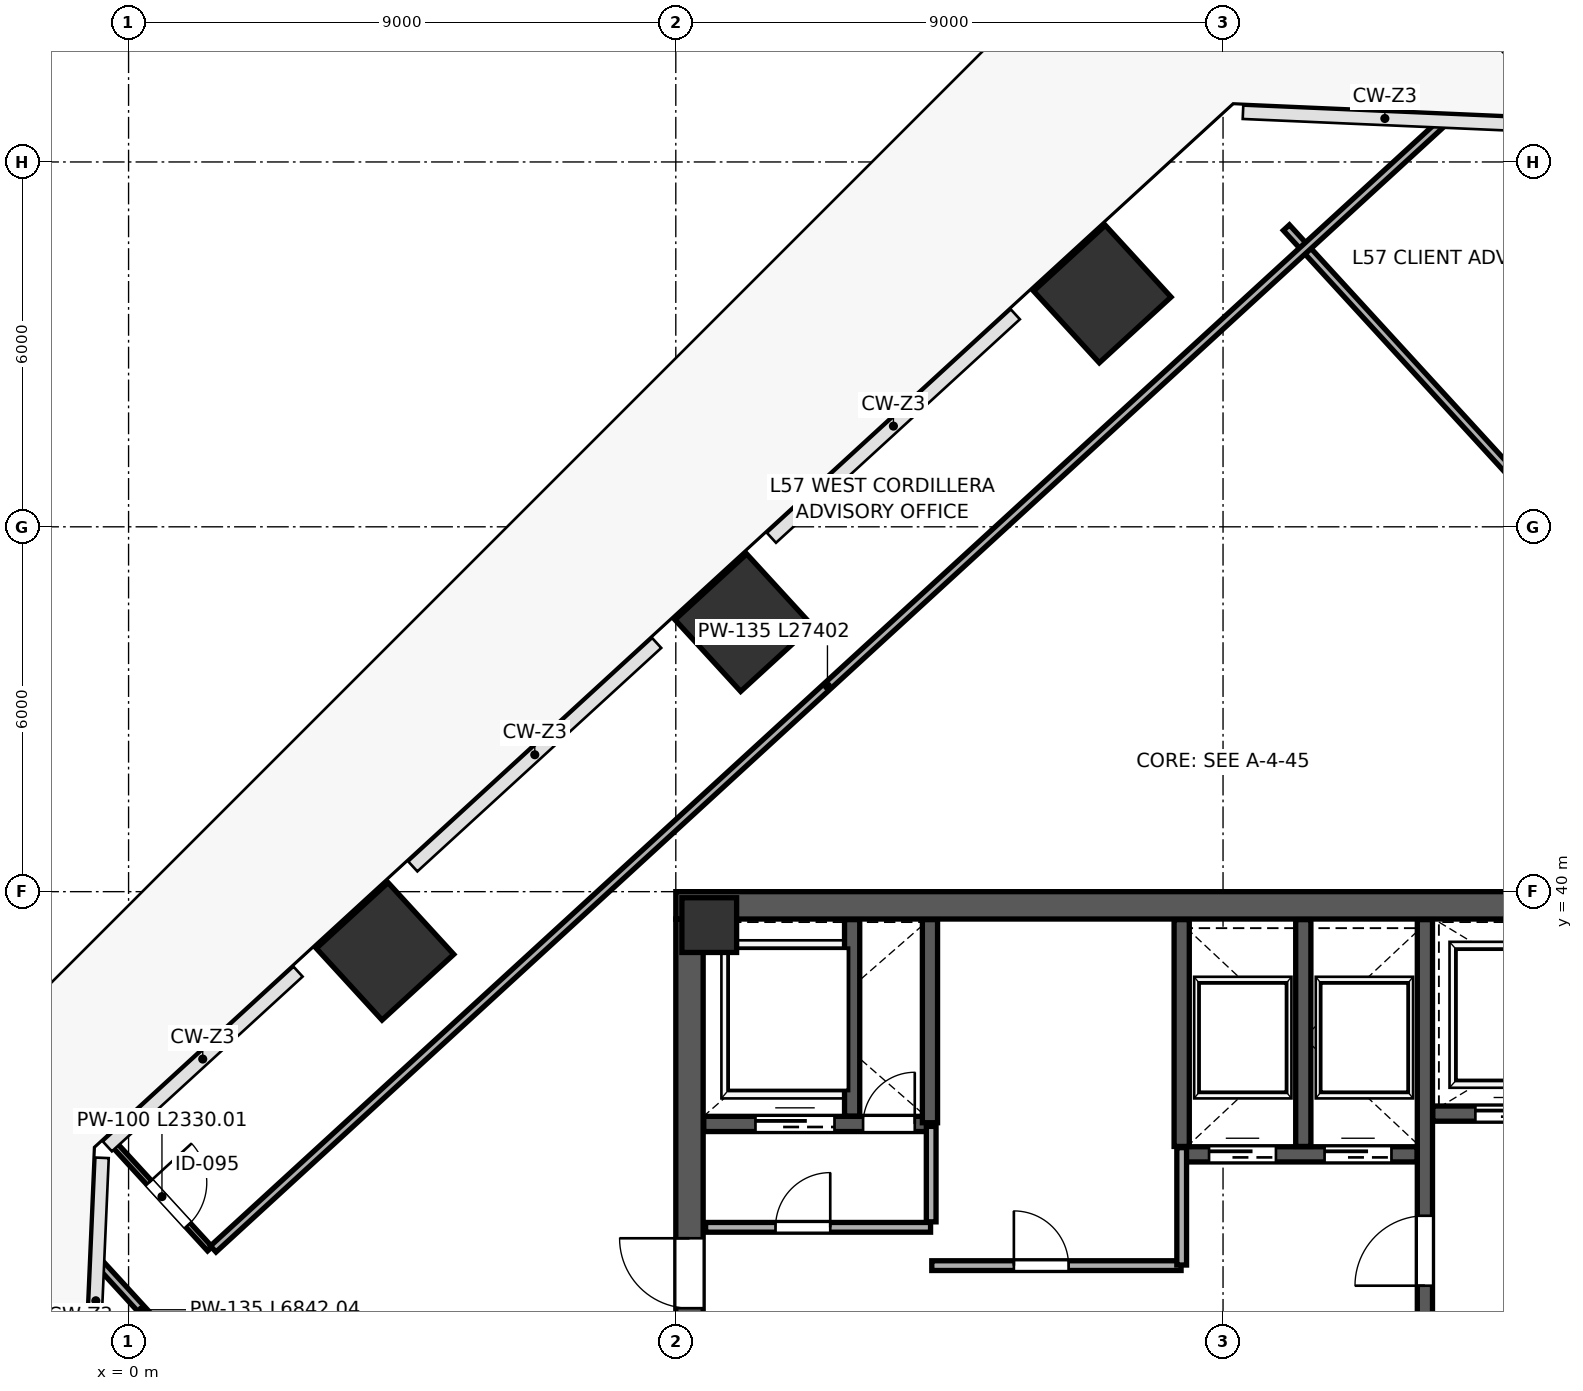
"""IFC4 building model, lengths in metres.
Left out: names, types, materials, properties, quantities, classifications, styles, units other than length and angle.
Written with IfcOpenShell. Run it as: python <this file> out.ifc"""

import sys

from ifc_helpers import new_model, si_unit, direction, frame, frame_2d, origin, origin_2d, place, context, subcontext, project, spatial, rectangle, extrude, source, transform, mapped, element, fill, save


model = new_model("IFC4")
c1 = context("Model", 3, precision=1e-05, world=origin(), true_north=direction((0.0, 1.0)))
c2 = subcontext(c1, "Body", "Model", "MODEL_VIEW")
j1 = project(units=[si_unit("LENGTHUNIT", "METRE"), si_unit("PLANEANGLEUNIT", "RADIAN")], contexts=[c1])
p1 = place(None, origin())
s1 = spatial("IfcSite", under=j1, at=p1, CompositionType="ELEMENT")
p2 = place(p1, origin())
s2 = spatial("IfcBuilding", under=s1, at=p2, CompositionType="ELEMENT")
p3 = place(p2, frame((0.0, 0.0, 254.2)))
s3 = spatial("IfcBuildingStorey", under=s2, at=p3, CompositionType="ELEMENT", Elevation=254.2)
m1 = source(origin(), c2, "Body", "SweptSolid", [
    extrude(rectangle(XDim=0.9, YDim=0.9, at=origin_2d()), origin(), (0.0, 0.0, 1.0), 4.198),
])
p4 = place(p3, frame((9.55, 39.45, 0.001), z_axis=(0.0, 0.0, 1.0), x_axis=(1.0, 0.0, 0.0)))
e1 = element("IfcColumn", 1, at=p4, inside=s3, PredefinedType="COLUMN", context=c2, shape_type="MappedRepresentation", body=[
    mapped(m1, transform((0.0, 0.0, 0.0), scale=1.0)),
])
m2 = source(origin(), c2, "Body", "SweptSolid", [
    extrude(rectangle(XDim=1.6, YDim=1.6, at=origin_2d()), origin(), (0.0, 0.0, 1.0), 4.198),
])
for number, where, z_axis, x_axis in (
    (2, (4.218, 39.018, 0.001), (0.0, 0.0, 1.0), (-0.676, 0.737, 0.0)),
    (3, (10.116, 44.423, 0.001), (0.0, 0.0, 1.0), (-0.676, 0.737, 0.0)),
    (4, (16.014, 49.828, 0.001), (0.0, 0.0, 1.0), (-0.676, 0.737, 0.0)),
):
    element("IfcColumn", number, at=place(p3, frame(where, z_axis=z_axis, x_axis=x_axis)), inside=s3, PredefinedType="COLUMN", context=c2, shape_type="MappedRepresentation", body=[
        mapped(m2, transform((0.0, 0.0, 0.0), scale=1.0)),
    ])
p5 = place(p3, frame((9.225, 24.45, 0.0), z_axis=(0.0, 0.0, 1.0), x_axis=(0.0, 1.0, 0.0)))
e5 = element("IfcWall", 5, at=p5, inside=s3, PredefinedType="SHEAR", context=c2, shape_type="SweptSolid", body=[
    extrude(rectangle(XDim=15.1, YDim=0.45, at=frame_2d((7.55, 0.0))), origin(), (0.0, 0.0, 1.0), 3.96),
])
p6 = place(p5, frame((8.7, 0.0, 0.0)))
e6 = element("IfcOpeningElement", 6, at=p6, cuts=e5, PredefinedType="OPENING", context=c2, shape_type="SweptSolid", body=[
    extrude(rectangle(XDim=1.15, YDim=2.2, at=frame_2d((0.575, 1.1))), frame((0.0, 0.235, 0.0), z_axis=(0.0, -1.0, 0.0), x_axis=(1.0, 0.0, 0.0)), (0.0, 0.0, 1.0), 0.47),
])
p7 = place(p3, frame((9.0, 39.775, 0.0), z_axis=(0.0, 0.0, 1.0), x_axis=(1.0, 0.0, 0.0)))
e7 = element("IfcWall", 7, at=p7, inside=s3, PredefinedType="SHEAR", context=c2, shape_type="SweptSolid", body=[
    extrude(rectangle(XDim=18.0, YDim=0.45, at=frame_2d((9.0, 0.0))), origin(), (0.0, 0.0, 1.0), 3.96),
])
p8 = place(p3, frame((21.32, 32.12, 0.0), z_axis=(0.0, 0.0, 1.0), x_axis=(0.0, 1.0, 0.0)))
e8 = element("IfcWall", 8, at=p8, inside=s3, PredefinedType="SHEAR", context=c2, shape_type="SweptSolid", body=[
    extrude(rectangle(XDim=7.42, YDim=0.25, at=frame_2d((3.71, 0.0))), origin(), (0.0, 0.0, 1.0), 3.96),
])
p9 = place(p8, frame((1.4, 0.0, 0.0)))
e9 = element("IfcOpeningElement", 9, at=p9, cuts=e8, PredefinedType="OPENING", context=c2, shape_type="SweptSolid", body=[
    extrude(rectangle(XDim=1.15, YDim=2.2, at=frame_2d((0.575, 1.1))), frame((0.0, 0.135, 0.0), z_axis=(0.0, -1.0, 0.0), x_axis=(1.0, 0.0, 0.0)), (0.0, 0.0, 1.0), 0.27),
])
p10 = place(p3, frame((9.46, 36.18, 0.0), z_axis=(0.0, 0.0, 1.0), x_axis=(1.0, 0.0, 0.0)))
e10 = element("IfcWall", 10, at=p10, inside=s3, PredefinedType="SHEAR", context=c2, shape_type="SweptSolid", body=[
    extrude(rectangle(XDim=3.79, YDim=0.25, at=frame_2d((1.895, 0.0))), origin(), (0.0, 0.0, 1.0), 3.96),
])
p11 = place(p10, frame((2.62, 0.0, 0.0)))
e11 = element("IfcOpeningElement", 11, at=p11, cuts=e10, PredefinedType="OPENING", context=c2, shape_type="SweptSolid", body=[
    extrude(rectangle(XDim=0.85, YDim=2.1, at=frame_2d((0.425, 1.05))), frame((0.0, 0.135, 0.0), z_axis=(0.0, -1.0, 0.0), x_axis=(1.0, 0.0, 0.0)), (0.0, 0.0, 1.0), 0.27),
])
p12 = place(p10, frame((0.85, 0.0, 0.0)))
e12 = element("IfcOpeningElement", 12, at=p12, cuts=e10, PredefinedType="OPENING", context=c2, shape_type="SweptSolid", body=[
    extrude(rectangle(XDim=1.3, YDim=2.25, at=frame_2d((0.65, 1.125))), frame((0.0, 0.135, 0.0), z_axis=(0.0, -1.0, 0.0), x_axis=(1.0, 0.0, 0.0)), (0.0, 0.0, 1.0), 0.27),
])
p13 = place(p3, frame((11.9, 36.31, 0.0), z_axis=(0.0, 0.0, 1.0), x_axis=(0.0, 1.0, 0.0)))
e13 = element("IfcWall", 13, at=p13, inside=s3, PredefinedType="SHEAR", context=c2, shape_type="SweptSolid", body=[
    extrude(rectangle(XDim=3.23, YDim=0.25, at=frame_2d((1.615, 0.0))), origin(), (0.0, 0.0, 1.0), 3.96),
])
p14 = place(p3, frame((21.45, 36.35, 0.0), z_axis=(0.0, 0.0, 1.0), x_axis=(1.0, 0.0, 0.0)))
e14 = element("IfcWall", 14, at=p14, inside=s3, PredefinedType="SHEAR", context=c2, shape_type="SweptSolid", body=[
    extrude(rectangle(XDim=5.09, YDim=0.25, at=frame_2d((2.545, 0.0))), origin(), (0.0, 0.0, 1.0), 3.96),
])
p15 = place(p14, frame((0.7, 0.0, 0.0)))
e15 = element("IfcOpeningElement", 15, at=p15, cuts=e14, PredefinedType="OPENING", context=c2, shape_type="SweptSolid", body=[
    extrude(rectangle(XDim=1.2, YDim=2.2, at=frame_2d((0.6, 1.1))), frame((0.0, 0.135, 0.0), z_axis=(0.0, -1.0, 0.0), x_axis=(1.0, 0.0, 0.0)), (0.0, 0.0, 1.0), 0.27),
])
p16 = place(p14, frame((3.25, 0.0, 0.0)))
e16 = element("IfcOpeningElement", 16, at=p16, cuts=e14, PredefinedType="OPENING", context=c2, shape_type="SweptSolid", body=[
    extrude(rectangle(XDim=1.2, YDim=2.2, at=frame_2d((0.6, 1.1))), frame((0.0, 0.135, 0.0), z_axis=(0.0, -1.0, 0.0), x_axis=(1.0, 0.0, 0.0)), (0.0, 0.0, 1.0), 0.27),
])
p17 = place(p3, frame((13.18, 36.2, 0.0), z_axis=(0.0, 0.0, 1.0), x_axis=(0.0, 1.0, 0.0)))
e17 = element("IfcWall", 17, at=p17, inside=s3, PredefinedType="SHEAR", context=c2, shape_type="SweptSolid", body=[
    extrude(rectangle(XDim=3.34, YDim=0.25, at=frame_2d((1.67, 0.0))), origin(), (0.0, 0.0, 1.0), 3.96),
])
p18 = place(p3, frame((17.32, 35.68, 0.0), z_axis=(0.0, 0.0, 1.0), x_axis=(1.0, 0.0, 0.0)))
e18 = element("IfcWall", 18, at=p18, inside=s3, PredefinedType="SHEAR", context=c2, shape_type="SweptSolid", body=[
    extrude(rectangle(XDim=3.87, YDim=0.25, at=frame_2d((1.935, 0.0))), origin(), (0.0, 0.0, 1.0), 3.96),
])
p19 = place(p18, frame((0.45, 0.0, 0.0)))
e19 = element("IfcOpeningElement", 19, at=p19, cuts=e18, PredefinedType="OPENING", context=c2, shape_type="SweptSolid", body=[
    extrude(rectangle(XDim=1.1, YDim=2.2, at=frame_2d((0.55, 1.1))), frame((0.0, 0.135, 0.0), z_axis=(0.0, -1.0, 0.0), x_axis=(1.0, 0.0, 0.0)), (0.0, 0.0, 1.0), 0.27),
])
p20 = place(p18, frame((2.35, 0.0, 0.0)))
e20 = element("IfcOpeningElement", 20, at=p20, cuts=e18, PredefinedType="OPENING", context=c2, shape_type="SweptSolid", body=[
    extrude(rectangle(XDim=1.1, YDim=2.2, at=frame_2d((0.55, 1.1))), frame((0.0, 0.135, 0.0), z_axis=(0.0, -1.0, 0.0), x_axis=(1.0, 0.0, 0.0)), (0.0, 0.0, 1.0), 0.27),
])
for number, where, z_axis, x_axis in (
    (21, (17.32, 35.81, 0.0), (0.0, 0.0, 1.0), (0.0, 1.0, 0.0)),
    (22, (19.32, 35.81, 0.0), (0.0, 0.0, 1.0), (0.0, 1.0, 0.0)),
):
    element("IfcWall", number, at=place(p3, frame(where, z_axis=z_axis, x_axis=x_axis)), inside=s3, PredefinedType="SHEAR", context=c2, shape_type="SweptSolid", body=[
        extrude(rectangle(XDim=3.73, YDim=0.25, at=frame_2d((1.865, 0.0))), origin(), (0.0, 0.0, 1.0), 3.96),
    ])
p21 = place(p3, frame((9.49, 34.48, 0.0), z_axis=(0.0, 0.0, 1.0), x_axis=(1.0, 0.0, 0.0)))
e23 = element("IfcWall", 23, at=p21, inside=s3, PredefinedType="PARTITIONING", context=c2, shape_type="SweptSolid", body=[
    extrude(rectangle(XDim=3.7, YDim=0.16, at=frame_2d((1.85, 0.0))), origin(), (0.0, 0.0, 1.0), 3.96),
])
p22 = place(p21, frame((1.15, 0.0, 0.0)))
e24 = element("IfcOpeningElement", 24, at=p22, cuts=e23, PredefinedType="OPENING", context=c2, shape_type="SweptSolid", body=[
    extrude(rectangle(XDim=0.9, YDim=2.15, at=frame_2d((0.45, 1.075))), frame((0.0, 0.09, 0.0), z_axis=(0.0, -1.0, 0.0), x_axis=(1.0, 0.0, 0.0)), (0.0, 0.0, 1.0), 0.18),
])
p23 = place(p3, frame((13.2, 34.57, 0.0), z_axis=(0.0, 0.0, 1.0), x_axis=(0.0, 1.0, 0.0)))
e25 = element("IfcWall", 25, at=p23, inside=s3, PredefinedType="PARTITIONING", context=c2, shape_type="SweptSolid", body=[
    extrude(rectangle(XDim=1.57, YDim=0.16, at=frame_2d((0.785, 0.0))), origin(), (0.0, 0.0, 1.0), 3.96),
])
p24 = place(p3, frame((13.21, 33.85, 0.0), z_axis=(0.0, 0.0, 1.0), x_axis=(1.0, 0.0, 0.0)))
e26 = element("IfcWall", 26, at=p24, inside=s3, PredefinedType="PARTITIONING", context=c2, shape_type="SweptSolid", body=[
    extrude(rectangle(XDim=4.1, YDim=0.16, at=frame_2d((2.05, 0.0))), origin(), (0.0, 0.0, 1.0), 3.96),
])
p25 = place(p24, frame((1.35, 0.0, 0.0)))
e27 = element("IfcOpeningElement", 27, at=p25, cuts=e26, PredefinedType="OPENING", context=c2, shape_type="SweptSolid", body=[
    extrude(rectangle(XDim=0.9, YDim=2.15, at=frame_2d((0.45, 1.075))), frame((0.0, 0.09, 0.0), z_axis=(0.0, -1.0, 0.0), x_axis=(1.0, 0.0, 0.0)), (0.0, 0.0, 1.0), 0.18),
])
p26 = place(p3, frame((17.32, 33.86, 0.0), z_axis=(0.0, 0.0, 1.0), x_axis=(0.0, 1.0, 0.0)))
e28 = element("IfcWall", 28, at=p26, inside=s3, PredefinedType="PARTITIONING", context=c2, shape_type="SweptSolid", body=[
    extrude(rectangle(XDim=1.93, YDim=0.16, at=frame_2d((0.965, 0.0))), origin(), (0.0, 0.0, 1.0), 3.96),
])
p27 = place(p3, frame((-0.474, 33.881, 0.0), z_axis=(0.0, 0.0, 1.0), x_axis=(0.675605050901, -0.73726373517, 0.0)))
e29 = element("IfcWall", 29, at=p27, inside=s3, PredefinedType="PARTITIONING", context=c2, shape_type="SweptSolid", body=[
    extrude(rectangle(XDim=6.842, YDim=0.135, at=frame_2d((3.421, 0.0))), origin(), (0.0, 0.0, 1.0), 3.96),
])
p28 = place(p27, frame((2.32, 0.0, 0.0)))
e30 = element("IfcOpeningElement", 30, at=p28, cuts=e29, PredefinedType="OPENING", context=c2, shape_type="SweptSolid", body=[
    extrude(rectangle(XDim=0.9, YDim=2.15, at=frame_2d((0.45, 1.075))), frame((0.0, 0.078, 0.0), z_axis=(0.0, -1.0, 0.0), x_axis=(1.0, 0.0, 0.0)), (0.0, 0.0, 1.0), 0.155),
])
p29 = place(p27, frame((4.42, 0.0, 0.0)))
e31 = element("IfcOpeningElement", 31, at=p29, cuts=e29, PredefinedType="OPENING", context=c2, shape_type="SweptSolid", body=[
    extrude(rectangle(XDim=0.95, YDim=2.15, at=frame_2d((0.475, 1.075))), frame((0.0, 0.078, 0.0), z_axis=(0.0, -1.0, 0.0), x_axis=(1.0, 0.0, 0.0)), (0.0, 0.0, 1.0), 0.155),
])
p30 = place(p3, frame((19.042, 50.92, 0.0), z_axis=(0.0, 0.0, 1.0), x_axis=(0.675589646996, -0.737277850523, 0.0)))
e32 = element("IfcWall", 32, at=p30, inside=s3, PredefinedType="PARTITIONING", context=c2, shape_type="SweptSolid", body=[
    extrude(rectangle(XDim=21.87, YDim=0.135, at=frame_2d((10.935, 0.0))), origin(), (0.0, 0.0, 1.0), 3.96),
])
p31 = place(p30, frame((5.4, 0.0, 0.0)))
e33 = element("IfcOpeningElement", 33, at=p31, cuts=e32, PredefinedType="OPENING", context=c2, shape_type="SweptSolid", body=[
    extrude(rectangle(XDim=0.95, YDim=2.15, at=frame_2d((0.475, 1.075))), frame((0.0, 0.078, 0.0), z_axis=(0.0, -1.0, 0.0), x_axis=(1.0, 0.0, 0.0)), (0.0, 0.0, 1.0), 0.155),
])
p32 = place(p30, frame((9.4, 0.0, 0.0)))
e34 = element("IfcOpeningElement", 34, at=p32, cuts=e32, PredefinedType="OPENING", context=c2, shape_type="SweptSolid", body=[
    extrude(rectangle(XDim=0.95, YDim=2.15, at=frame_2d((0.475, 1.075))), frame((0.0, 0.078, 0.0), z_axis=(0.0, -1.0, 0.0), x_axis=(1.0, 0.0, 0.0)), (0.0, 0.0, 1.0), 0.155),
])
p33 = place(p3, frame((-0.238, 35.844, 0.0), z_axis=(0.0, 0.0, 1.0), x_axis=(0.67562972666, -0.737241122329, 0.0)))
e35 = element("IfcWall", 35, at=p33, inside=s3, PredefinedType="PARTITIONING", context=c2, shape_type="SweptSolid", body=[
    extrude(rectangle(XDim=2.33, YDim=0.1, at=frame_2d((1.165, 0.0))), origin(), (0.0, 0.0, 1.0), 3.96),
])
p34 = place(p33, frame((0.85, 0.0, 0.0)))
e36 = element("IfcOpeningElement", 36, at=p34, cuts=e35, PredefinedType="OPENING", context=c2, shape_type="SweptSolid", body=[
    extrude(rectangle(XDim=0.95, YDim=2.15, at=frame_2d((0.475, 1.075))), frame((0.0, 0.06, 0.0), z_axis=(0.0, -1.0, 0.0), x_axis=(1.0, 0.0, 0.0)), (0.0, 0.0, 1.0), 0.12),
])
p35 = place(p3, frame((1.393, 34.124, 0.0), z_axis=(0.0, 0.0, 1.0), x_axis=(0.737274323436, 0.675593496121, 0.0)))
e37 = element("IfcWall", 37, at=p35, inside=s3, PredefinedType="PARTITIONING", context=c2, shape_type="SweptSolid", body=[
    extrude(rectangle(XDim=27.402, YDim=0.135, at=frame_2d((13.701, 0.0))), origin(), (0.0, 0.0, 1.0), 3.96),
])
m3 = source(origin(), c2, "Body", "SweptSolid", [
    extrude(rectangle(XDim=1.15, YDim=2.2, at=frame_2d((0.575, 1.1))), frame((0.0, 0.025, 0.0), z_axis=(0.0, -1.0, 0.0), x_axis=(1.0, 0.0, 0.0)), (0.0, 0.0, 1.0), 0.05),
])
p36 = place(p9, origin())
e38 = element("IfcDoor", 38, at=p36, inside=s3, OperationType="SINGLE_SWING_LEFT", PredefinedType="DOOR", context=c2, shape_type="MappedRepresentation", body=[
    mapped(m3, transform((0.0, 0.0, 0.0), scale=1.0)),
])
fill(e9, e38)
p37 = place(p6, origin())
e39 = element("IfcDoor", 39, at=p37, inside=s3, OperationType="SINGLE_SWING_RIGHT", PredefinedType="DOOR", context=c2, shape_type="MappedRepresentation", body=[
    mapped(m3, transform((0.0, 0.0, 0.0), scale=1.0)),
])
fill(e6, e39)
m4 = source(origin(), c2, "Body", "SweptSolid", [
    extrude(rectangle(XDim=0.85, YDim=2.1, at=frame_2d((0.425, 1.05))), frame((0.0, 0.025, 0.0), z_axis=(0.0, -1.0, 0.0), x_axis=(1.0, 0.0, 0.0)), (0.0, 0.0, 1.0), 0.05),
])
p38 = place(p11, origin())
e40 = element("IfcDoor", 40, at=p38, inside=s3, OperationType="SINGLE_SWING_RIGHT", PredefinedType="DOOR", context=c2, shape_type="MappedRepresentation", body=[
    mapped(m4, transform((0.0, 0.0, 0.0), scale=1.0)),
])
fill(e11, e40)
m5 = source(origin(), c2, "Body", "SweptSolid", [
    extrude(rectangle(XDim=1.1, YDim=2.2, at=frame_2d((0.55, 1.1))), frame((0.0, 0.025, 0.0), z_axis=(0.0, -1.0, 0.0), x_axis=(1.0, 0.0, 0.0)), (0.0, 0.0, 1.0), 0.05),
])
p39 = place(p19, origin())
e41 = element("IfcDoor", 41, at=p39, inside=s3, OperationType="SLIDING_TO_LEFT", PredefinedType="DOOR", context=c2, shape_type="MappedRepresentation", body=[
    mapped(m5, transform((0.0, 0.0, 0.0), scale=1.0)),
])
fill(e19, e41)
p40 = place(p20, origin())
e42 = element("IfcDoor", 42, at=p40, inside=s3, OperationType="SLIDING_TO_RIGHT", PredefinedType="DOOR", context=c2, shape_type="MappedRepresentation", body=[
    mapped(m5, transform((0.0, 0.0, 0.0), scale=1.0)),
])
fill(e20, e42)
m6 = source(origin(), c2, "Body", "SweptSolid", [
    extrude(rectangle(XDim=1.2, YDim=2.2, at=frame_2d((0.6, 1.1))), frame((0.0, 0.025, 0.0), z_axis=(0.0, -1.0, 0.0), x_axis=(1.0, 0.0, 0.0)), (0.0, 0.0, 1.0), 0.05),
])
p41 = place(p15, origin())
e43 = element("IfcDoor", 43, at=p41, inside=s3, OperationType="SLIDING_TO_LEFT", PredefinedType="DOOR", context=c2, shape_type="MappedRepresentation", body=[
    mapped(m6, transform((0.0, 0.0, 0.0), scale=1.0)),
])
fill(e15, e43)
m7 = source(origin(), c2, "Body", "SweptSolid", [
    extrude(rectangle(XDim=1.3, YDim=2.25, at=frame_2d((0.65, 1.125))), frame((0.0, 0.025, 0.0), z_axis=(0.0, -1.0, 0.0), x_axis=(1.0, 0.0, 0.0)), (0.0, 0.0, 1.0), 0.05),
])
p42 = place(p12, origin())
e44 = element("IfcDoor", 44, at=p42, inside=s3, OperationType="SLIDING_TO_LEFT", PredefinedType="DOOR", context=c2, shape_type="MappedRepresentation", body=[
    mapped(m7, transform((0.0, 0.0, 0.0), scale=1.0)),
])
fill(e12, e44)
m8 = source(origin(), c2, "Body", "SweptSolid", [
    extrude(rectangle(XDim=0.9, YDim=2.15, at=frame_2d((0.45, 1.075))), frame((0.0, 0.025, 0.0), z_axis=(0.0, -1.0, 0.0), x_axis=(1.0, 0.0, 0.0)), (0.0, 0.0, 1.0), 0.05),
])
p43 = place(p22, origin())
e45 = element("IfcDoor", 45, at=p43, inside=s3, OperationType="SINGLE_SWING_RIGHT", PredefinedType="DOOR", context=c2, shape_type="MappedRepresentation", body=[
    mapped(m8, transform((0.0, 0.0, 0.0), scale=1.0)),
])
fill(e24, e45)
p44 = place(p25, origin())
e46 = element("IfcDoor", 46, at=p44, inside=s3, OperationType="SINGLE_SWING_LEFT", PredefinedType="DOOR", context=c2, shape_type="MappedRepresentation", body=[
    mapped(m8, transform((0.0, 0.0, 0.0), scale=1.0)),
])
fill(e27, e46)
m9 = source(origin(), c2, "Body", "SweptSolid", [
    extrude(rectangle(XDim=0.95, YDim=2.15, at=frame_2d((0.475, 1.075))), frame((0.0, 0.025, 0.0), z_axis=(0.0, -1.0, 0.0), x_axis=(1.0, 0.0, 0.0)), (0.0, 0.0, 1.0), 0.05),
])
p45 = place(p34, origin())
e47 = element("IfcDoor", 47, at=p45, inside=s3, OperationType="SINGLE_SWING_LEFT", PredefinedType="DOOR", context=c2, shape_type="MappedRepresentation", body=[
    mapped(m9, transform((0.0, 0.0, 0.0), scale=1.0)),
])
fill(e36, e47)
save(model, sys.argv[1])
